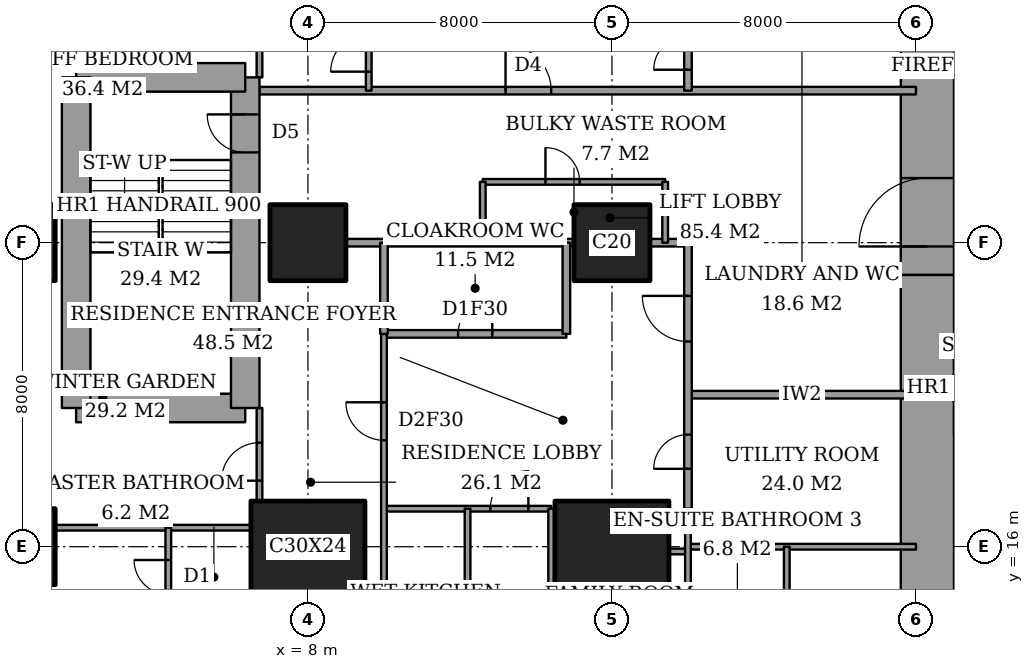
"""IFC4 building model, lengths in metres.
Left out: names, types, materials, properties, quantities, classifications, styles, units other than length and angle.
Written with IfcOpenShell. Run it as: python <this file> out.ifc"""

import sys

from ifc_helpers import new_model, si_unit, direction, frame, frame_2d, origin, origin_2d, place, context, subcontext, project, spatial, rectangle, extrude, element, fill, save


model = new_model("IFC4")
c1 = context("Model", 3, precision=1e-05, world=origin(), true_north=direction((0.0, 1.0)))
c2 = subcontext(c1, "Body", "Model", "MODEL_VIEW")
j1 = project(units=[si_unit("LENGTHUNIT", "METRE"), si_unit("PLANEANGLEUNIT", "RADIAN")], contexts=[c1])
p1 = place(None, origin())
s1 = spatial("IfcSite", under=j1, at=p1, CompositionType="ELEMENT")
p2 = place(p1, origin())
s2 = spatial("IfcBuilding", under=s1, at=p2, CompositionType="ELEMENT")
p3 = place(p2, frame((0.0, 0.0, 54.8)))
s3 = spatial("IfcBuildingStorey", under=s2, at=p3, CompositionType="ELEMENT", Elevation=54.8)
for number, where, z_axis, x_axis in (
    (1, (0.35, 16.0, 0.0), (0.0, 0.0, 1.0), (1.0, 0.0, 0.0)),
    (2, (0.35, 24.0, 0.0), (0.0, 0.0, 1.0), (1.0, 0.0, 0.0)),
):
    element("IfcColumn", number, at=place(p3, frame(where, z_axis=z_axis, x_axis=x_axis)), inside=s3, PredefinedType="COLUMN", context=c2, shape_type="SweptSolid", body=[
        extrude(rectangle(XDim=2.0, YDim=2.0, at=origin_2d()), origin(), (0.0, 0.0, 1.0), 3.6),
    ])
p4 = place(p3, frame((8.0, 16.0, 0.0), z_axis=(0.0, 0.0, 1.0), x_axis=(1.0, 0.0, 0.0)))
e3 = element("IfcColumn", 3, at=p4, inside=s3, PredefinedType="COLUMN", context=c2, shape_type="SweptSolid", body=[
    extrude(rectangle(XDim=3.0, YDim=2.4, at=origin_2d()), origin(), (0.0, 0.0, 1.0), 3.6),
])
p5 = place(p3, frame((8.0, 24.0, 0.0), z_axis=(0.0, 0.0, 1.0), x_axis=(1.0, 0.0, 0.0)))
e4 = element("IfcColumn", 4, at=p5, inside=s3, PredefinedType="COLUMN", context=c2, shape_type="SweptSolid", body=[
    extrude(rectangle(XDim=2.0, YDim=2.0, at=origin_2d()), origin(), (0.0, 0.0, 1.0), 3.6),
])
p6 = place(p3, frame((16.0, 16.0, 0.0), z_axis=(0.0, 0.0, 1.0), x_axis=(1.0, 0.0, 0.0)))
e5 = element("IfcColumn", 5, at=p6, inside=s3, PredefinedType="COLUMN", context=c2, shape_type="SweptSolid", body=[
    extrude(rectangle(XDim=3.0, YDim=2.4, at=origin_2d()), origin(), (0.0, 0.0, 1.0), 3.6),
])
p7 = place(p3, frame((16.0, 24.0, 0.0), z_axis=(0.0, 0.0, 1.0), x_axis=(1.0, 0.0, 0.0)))
e6 = element("IfcColumn", 6, at=p7, inside=s3, PredefinedType="COLUMN", context=c2, shape_type="SweptSolid", body=[
    extrude(rectangle(XDim=2.0, YDim=2.0, at=origin_2d()), origin(), (0.0, 0.0, 1.0), 3.6),
])
p8 = place(p3, frame((24.3, 13.0, 0.0), z_axis=(0.0, 0.0, 1.0), x_axis=(0.0, 1.0, 0.0)))
e7 = element("IfcWall", 7, at=p8, inside=s3, PredefinedType="SHEAR", context=c2, shape_type="SweptSolid", body=[
    extrude(rectangle(XDim=10.15, YDim=1.4, at=frame_2d((5.075, 0.0))), origin(), (0.0, 0.0, 1.0), 3.6),
])
p9 = place(p3, frame((24.3, 23.15, 0.0), z_axis=(0.0, 0.0, 1.0), x_axis=(0.0, 1.0, 0.0)))
e8 = element("IfcWall", 8, at=p9, inside=s3, PredefinedType="SHEAR", context=c2, shape_type="SweptSolid", body=[
    extrude(rectangle(XDim=11.85, YDim=1.4, at=frame_2d((5.925, 0.0))), origin(), (0.0, 0.0, 1.0), 3.6),
])
p10 = place(p9, frame((0.75, 0.0, 0.0)))
e9 = element("IfcOpeningElement", 9, at=p10, cuts=e8, PredefinedType="OPENING", context=c2, shape_type="SweptSolid", body=[
    extrude(rectangle(XDim=1.8, YDim=2.4, at=frame_2d((0.9, 1.2))), frame((0.0, 0.71, 0.0), z_axis=(0.0, -1.0, 0.0), x_axis=(1.0, 0.0, 0.0)), (0.0, 0.0, 1.0), 1.42),
])
p11 = place(p3, frame((1.9, 19.65, 0.0), z_axis=(0.0, 0.0, 1.0), x_axis=(1.0, 0.0, 0.0)))
e10 = element("IfcWall", 10, at=p11, inside=s3, PredefinedType="SHEAR", context=c2, shape_type="SweptSolid", body=[
    extrude(rectangle(XDim=4.45, YDim=0.75, at=frame_2d((2.225, 0.0))), origin(), (0.0, 0.0, 1.0), 3.6),
])
p12 = place(p3, frame((6.35, 19.65, 0.0), z_axis=(0.0, 0.0, 1.0), x_axis=(0.0, 1.0, 0.0)))
e11 = element("IfcWall", 11, at=p12, inside=s3, PredefinedType="SHEAR", context=c2, shape_type="SweptSolid", body=[
    extrude(rectangle(XDim=8.7, YDim=0.75, at=frame_2d((4.35, 0.0))), origin(), (0.0, 0.0, 1.0), 3.6),
])
p13 = place(p12, frame((6.725, 0.0, 0.0)))
e12 = element("IfcOpeningElement", 12, at=p13, cuts=e11, PredefinedType="OPENING", context=c2, shape_type="SweptSolid", body=[
    extrude(rectangle(XDim=1.0, YDim=2.1, at=frame_2d((0.5, 1.05))), frame((0.0, 0.385, 0.0), z_axis=(0.0, -1.0, 0.0), x_axis=(1.0, 0.0, 0.0)), (0.0, 0.0, 1.0), 0.77),
])
p14 = place(p3, frame((6.35, 28.35, 0.0), z_axis=(0.0, 0.0, 1.0), x_axis=(-1.0, 0.0, 0.0)))
e13 = element("IfcWall", 13, at=p14, inside=s3, PredefinedType="SHEAR", context=c2, shape_type="SweptSolid", body=[
    extrude(rectangle(XDim=4.45, YDim=0.75, at=frame_2d((2.225, 0.0))), origin(), (0.0, 0.0, 1.0), 3.6),
])
p15 = place(p3, frame((1.9, 28.35, 0.0), z_axis=(0.0, 0.0, 1.0), x_axis=(0.0, -1.0, 0.0)))
e14 = element("IfcWall", 14, at=p15, inside=s3, PredefinedType="SHEAR", context=c2, shape_type="SweptSolid", body=[
    extrude(rectangle(XDim=8.7, YDim=0.75, at=frame_2d((4.35, 0.0))), origin(), (0.0, 0.0, 1.0), 3.6),
])
p16 = place(p3, frame((17.5, 15.875, 0.0), z_axis=(0.0, 0.0, 1.0), x_axis=(1.0, 0.0, 0.0)))
e15 = element("IfcWall", 15, at=p16, inside=s3, PredefinedType="PARTITIONING", context=c2, shape_type="SweptSolid", body=[
    extrude(rectangle(XDim=0.5, YDim=0.15, at=frame_2d((0.25, 0.0))), origin(), (0.0, 0.0, 1.0), 2.634),
])
p17 = place(p3, frame((18.0, 16.0, 0.0), z_axis=(0.0, 0.0, 1.0), x_axis=(1.0, 0.0, 0.0)))
e16 = element("IfcWall", 16, at=p17, inside=s3, PredefinedType="PARTITIONING", context=c2, shape_type="SweptSolid", body=[
    extrude(rectangle(XDim=6.0, YDim=0.15, at=frame_2d((3.0, 0.0))), origin(), (0.0, 0.0, 1.0), 2.634),
])
p18 = place(p3, frame((1.35, 16.5, 0.0), z_axis=(0.0, 0.0, 1.0), x_axis=(1.0, 0.0, 0.0)))
e17 = element("IfcWall", 17, at=p18, inside=s3, PredefinedType="PARTITIONING", context=c2, shape_type="SweptSolid", body=[
    extrude(rectangle(XDim=5.15, YDim=0.15, at=frame_2d((2.575, 0.0))), origin(), (0.0, 0.0, 1.0), 3.35),
])
p19 = place(p3, frame((10.0, 17.0, 0.0), z_axis=(0.0, 0.0, 1.0), x_axis=(1.0, 0.0, 0.0)))
e18 = element("IfcWall", 18, at=p19, inside=s3, PredefinedType="PARTITIONING", context=c2, shape_type="SweptSolid", body=[
    extrude(rectangle(XDim=4.4, YDim=0.15, at=frame_2d((2.2, 0.0))), origin(), (0.0, 0.0, 1.0), 3.35),
])
p20 = place(p19, frame((2.8, 0.0, 0.0)))
e19 = element("IfcOpeningElement", 19, at=p20, cuts=e18, PredefinedType="OPENING", context=c2, shape_type="SweptSolid", body=[
    extrude(rectangle(XDim=1.0, YDim=2.1, at=frame_2d((0.5, 1.05))), frame((0.0, 0.085, 0.0), z_axis=(0.0, -1.0, 0.0), x_axis=(1.0, 0.0, 0.0)), (0.0, 0.0, 1.0), 0.17),
])
p21 = place(p3, frame((18.0, 20.0, 0.0), z_axis=(0.0, 0.0, 1.0), x_axis=(1.0, 0.0, 0.0)))
e20 = element("IfcWall", 20, at=p21, inside=s3, PredefinedType="PARTITIONING", context=c2, shape_type="SweptSolid", body=[
    extrude(rectangle(XDim=6.0, YDim=0.2, at=frame_2d((3.0, 0.0))), origin(), (0.0, 0.0, 1.0), 3.35),
])
p22 = place(p3, frame((10.0, 21.6, 0.0), z_axis=(0.0, 0.0, 1.0), x_axis=(1.0, 0.0, 0.0)))
e21 = element("IfcWall", 21, at=p22, inside=s3, PredefinedType="PARTITIONING", context=c2, shape_type="SweptSolid", body=[
    extrude(rectangle(XDim=4.8, YDim=0.2, at=frame_2d((2.4, 0.0))), origin(), (0.0, 0.0, 1.0), 3.35),
])
p23 = place(p22, frame((1.95, 0.0, 0.0)))
e22 = element("IfcOpeningElement", 22, at=p23, cuts=e21, PredefinedType="OPENING", context=c2, shape_type="SweptSolid", body=[
    extrude(rectangle(XDim=0.9, YDim=2.1, at=frame_2d((0.45, 1.05))), frame((0.0, 0.11, 0.0), z_axis=(0.0, -1.0, 0.0), x_axis=(1.0, 0.0, 0.0)), (0.0, 0.0, 1.0), 0.22),
])
p24 = place(p3, frame((9.0, 24.0, 0.0), z_axis=(0.0, 0.0, 1.0), x_axis=(1.0, 0.0, 0.0)))
e23 = element("IfcWall", 23, at=p24, inside=s3, PredefinedType="PARTITIONING", context=c2, shape_type="SweptSolid", body=[
    extrude(rectangle(XDim=6.0, YDim=0.2, at=frame_2d((3.0, 0.0))), origin(), (0.0, 0.0, 1.0), 3.35),
])
p25 = place(p3, frame((17.0, 24.0, 0.0), z_axis=(0.0, 0.0, 1.0), x_axis=(1.0, 0.0, 0.0)))
e24 = element("IfcWall", 24, at=p25, inside=s3, PredefinedType="PARTITIONING", context=c2, shape_type="SweptSolid", body=[
    extrude(rectangle(XDim=1.0, YDim=0.2, at=frame_2d((0.5, 0.0))), origin(), (0.0, 0.0, 1.0), 3.35),
])
p26 = place(p3, frame((12.6, 25.6, 0.0), z_axis=(0.0, 0.0, 1.0), x_axis=(1.0, 0.0, 0.0)))
e25 = element("IfcWall", 25, at=p26, inside=s3, PredefinedType="PARTITIONING", context=c2, shape_type="SweptSolid", body=[
    extrude(rectangle(XDim=4.8, YDim=0.15, at=frame_2d((2.4, 0.0))), origin(), (0.0, 0.0, 1.0), 3.35),
])
p27 = place(p26, frame((1.65, 0.0, 0.0)))
e26 = element("IfcOpeningElement", 26, at=p27, cuts=e25, PredefinedType="OPENING", context=c2, shape_type="SweptSolid", body=[
    extrude(rectangle(XDim=0.9, YDim=2.1, at=frame_2d((0.45, 1.05))), frame((0.0, 0.085, 0.0), z_axis=(0.0, -1.0, 0.0), x_axis=(1.0, 0.0, 0.0)), (0.0, 0.0, 1.0), 0.17),
])
p28 = place(p3, frame((6.725, 28.0, 0.0), z_axis=(0.0, 0.0, 1.0), x_axis=(1.0, 0.0, 0.0)))
e27 = element("IfcWall", 27, at=p28, inside=s3, PredefinedType="PARTITIONING", context=c2, shape_type="SweptSolid", body=[
    extrude(rectangle(XDim=17.275, YDim=0.2, at=frame_2d((8.637, 0.0))), origin(), (0.0, 0.0, 1.0), 3.35),
])
p29 = place(p28, frame((6.475, 0.0, 0.0)))
e28 = element("IfcOpeningElement", 28, at=p29, cuts=e27, PredefinedType="OPENING", context=c2, shape_type="SweptSolid", body=[
    extrude(rectangle(XDim=1.2, YDim=2.4, at=frame_2d((0.6, 1.2))), frame((0.0, 0.11, 0.0), z_axis=(0.0, -1.0, 0.0), x_axis=(1.0, 0.0, 0.0)), (0.0, 0.0, 1.0), 0.22),
])
p30 = place(p3, frame((4.325, 13.9, 0.0), z_axis=(0.0, 0.0, 1.0), x_axis=(0.0, 1.0, 0.0)))
e29 = element("IfcWall", 29, at=p30, inside=s3, PredefinedType="PARTITIONING", context=c2, shape_type="SweptSolid", body=[
    extrude(rectangle(XDim=2.6, YDim=0.15, at=frame_2d((1.3, 0.0))), origin(), (0.0, 0.0, 1.0), 3.35),
])
p31 = place(p30, frame((0.85, 0.0, 0.0)))
e30 = element("IfcOpeningElement", 30, at=p31, cuts=e29, PredefinedType="OPENING", context=c2, shape_type="SweptSolid", body=[
    extrude(rectangle(XDim=0.9, YDim=2.1, at=frame_2d((0.45, 1.05))), frame((0.0, 0.085, 0.0), z_axis=(0.0, -1.0, 0.0), x_axis=(1.0, 0.0, 0.0)), (0.0, 0.0, 1.0), 0.17),
])
p32 = place(p3, frame((6.725, 17.2, 0.0), z_axis=(0.0, 0.0, 1.0), x_axis=(0.0, 1.0, 0.0)))
e31 = element("IfcWall", 31, at=p32, inside=s3, PredefinedType="PARTITIONING", context=c2, shape_type="SweptSolid", body=[
    extrude(rectangle(XDim=2.45, YDim=0.15, at=frame_2d((1.225, 0.0))), origin(), (0.0, 0.0, 1.0), 3.35),
])
p33 = place(p32, frame((0.538, 0.0, 0.0)))
e32 = element("IfcOpeningElement", 32, at=p33, cuts=e31, PredefinedType="OPENING", context=c2, shape_type="SweptSolid", body=[
    extrude(rectangle(XDim=1.0, YDim=2.1, at=frame_2d((0.5, 1.05))), frame((0.0, 0.085, 0.0), z_axis=(0.0, -1.0, 0.0), x_axis=(1.0, 0.0, 0.0)), (0.0, 0.0, 1.0), 0.17),
])
p34 = place(p3, frame((6.725, 28.35, 0.0), z_axis=(0.0, 0.0, 1.0), x_axis=(0.0, 1.0, 0.0)))
e33 = element("IfcWall", 33, at=p34, inside=s3, PredefinedType="PARTITIONING", context=c2, shape_type="SweptSolid", body=[
    extrude(rectangle(XDim=2.45, YDim=0.15, at=frame_2d((1.225, 0.0))), origin(), (0.0, 0.0, 1.0), 3.35),
])
p35 = place(p34, frame((0.913, 0.0, 0.0)))
e34 = element("IfcOpeningElement", 34, at=p35, cuts=e33, PredefinedType="OPENING", context=c2, shape_type="SweptSolid", body=[
    extrude(rectangle(XDim=1.0, YDim=2.1, at=frame_2d((0.5, 1.05))), frame((0.0, 0.085, 0.0), z_axis=(0.0, -1.0, 0.0), x_axis=(1.0, 0.0, 0.0)), (0.0, 0.0, 1.0), 0.17),
])
p36 = place(p3, frame((9.6, 28.0, 0.0), z_axis=(0.0, 0.0, 1.0), x_axis=(0.0, 1.0, 0.0)))
e35 = element("IfcWall", 35, at=p36, inside=s3, PredefinedType="PARTITIONING", context=c2, shape_type="SweptSolid", body=[
    extrude(rectangle(XDim=9.4, YDim=0.15, at=frame_2d((4.7, 0.0))), origin(), (0.0, 0.0, 1.0), 3.35),
])
p37 = place(p36, frame((0.5, 0.0, 0.0)))
e36 = element("IfcOpeningElement", 36, at=p37, cuts=e35, PredefinedType="OPENING", context=c2, shape_type="SweptSolid", body=[
    extrude(rectangle(XDim=1.0, YDim=2.1, at=frame_2d((0.5, 1.05))), frame((0.0, 0.085, 0.0), z_axis=(0.0, -1.0, 0.0), x_axis=(1.0, 0.0, 0.0)), (0.0, 0.0, 1.0), 0.17),
])
p38 = place(p3, frame((10.0, 21.6, 0.0), z_axis=(0.0, 0.0, 1.0), x_axis=(0.0, 1.0, 0.0)))
e37 = element("IfcWall", 37, at=p38, inside=s3, PredefinedType="PARTITIONING", context=c2, shape_type="SweptSolid", body=[
    extrude(rectangle(XDim=2.4, YDim=0.2, at=frame_2d((1.2, 0.0))), origin(), (0.0, 0.0, 1.0), 3.35),
])
p39 = place(p3, frame((10.0, 10.6, 0.0), z_axis=(0.0, 0.0, 1.0), x_axis=(0.0, 1.0, 0.0)))
e38 = element("IfcWall", 38, at=p39, inside=s3, PredefinedType="PARTITIONING", context=c2, shape_type="SweptSolid", body=[
    extrude(rectangle(XDim=11.0, YDim=0.15, at=frame_2d((5.5, 0.0))), origin(), (0.0, 0.0, 1.0), 3.35),
])
p40 = place(p39, frame((8.2, 0.0, 0.0)))
e39 = element("IfcOpeningElement", 39, at=p40, cuts=e38, PredefinedType="OPENING", context=c2, shape_type="SweptSolid", body=[
    extrude(rectangle(XDim=1.0, YDim=2.1, at=frame_2d((0.5, 1.05))), frame((0.0, 0.085, 0.0), z_axis=(0.0, -1.0, 0.0), x_axis=(1.0, 0.0, 0.0)), (0.0, 0.0, 1.0), 0.17),
])
p41 = place(p3, frame((12.2, 10.6, 0.0), z_axis=(0.0, 0.0, 1.0), x_axis=(0.0, 1.0, 0.0)))
e40 = element("IfcWall", 40, at=p41, inside=s3, PredefinedType="PARTITIONING", context=c2, shape_type="SweptSolid", body=[
    extrude(rectangle(XDim=6.4, YDim=0.15, at=frame_2d((3.2, 0.0))), origin(), (0.0, 0.0, 1.0), 3.35),
])
p42 = place(p3, frame((12.6, 24.0, 0.0), z_axis=(0.0, 0.0, 1.0), x_axis=(0.0, 1.0, 0.0)))
e41 = element("IfcWall", 41, at=p42, inside=s3, PredefinedType="PARTITIONING", context=c2, shape_type="SweptSolid", body=[
    extrude(rectangle(XDim=1.6, YDim=0.15, at=frame_2d((0.8, 0.0))), origin(), (0.0, 0.0, 1.0), 3.35),
])
p43 = place(p3, frame((14.4, 10.6, 0.0), z_axis=(0.0, 0.0, 1.0), x_axis=(0.0, 1.0, 0.0)))
e42 = element("IfcWall", 42, at=p43, inside=s3, PredefinedType="PARTITIONING", context=c2, shape_type="SweptSolid", body=[
    extrude(rectangle(XDim=6.4, YDim=0.15, at=frame_2d((3.2, 0.0))), origin(), (0.0, 0.0, 1.0), 3.35),
])
p44 = place(p3, frame((14.8, 21.6, 0.0), z_axis=(0.0, 0.0, 1.0), x_axis=(0.0, 1.0, 0.0)))
e43 = element("IfcWall", 43, at=p44, inside=s3, PredefinedType="PARTITIONING", context=c2, shape_type="SweptSolid", body=[
    extrude(rectangle(XDim=2.4, YDim=0.2, at=frame_2d((1.2, 0.0))), origin(), (0.0, 0.0, 1.0), 3.35),
])
p45 = place(p3, frame((17.4, 24.0, 0.0), z_axis=(0.0, 0.0, 1.0), x_axis=(0.0, 1.0, 0.0)))
e44 = element("IfcWall", 44, at=p45, inside=s3, PredefinedType="PARTITIONING", context=c2, shape_type="SweptSolid", body=[
    extrude(rectangle(XDim=1.6, YDim=0.15, at=frame_2d((0.8, 0.0))), origin(), (0.0, 0.0, 1.0), 3.35),
])
p46 = place(p3, frame((18.0, 17.0, 0.0), z_axis=(0.0, 0.0, 1.0), x_axis=(0.0, 1.0, 0.0)))
e45 = element("IfcWall", 45, at=p46, inside=s3, PredefinedType="PARTITIONING", context=c2, shape_type="SweptSolid", body=[
    extrude(rectangle(XDim=7.0, YDim=0.2, at=frame_2d((3.5, 0.0))), origin(), (0.0, 0.0, 1.0), 3.35),
])
p47 = place(p46, frame((4.4, 0.0, 0.0)))
e46 = element("IfcOpeningElement", 46, at=p47, cuts=e45, PredefinedType="OPENING", context=c2, shape_type="SweptSolid", body=[
    extrude(rectangle(XDim=1.2, YDim=2.4, at=frame_2d((0.6, 1.2))), frame((0.0, 0.11, 0.0), z_axis=(0.0, -1.0, 0.0), x_axis=(1.0, 0.0, 0.0)), (0.0, 0.0, 1.0), 0.22),
])
p48 = place(p46, frame((1.05, 0.0, 0.0)))
e47 = element("IfcOpeningElement", 47, at=p48, cuts=e45, PredefinedType="OPENING", context=c2, shape_type="SweptSolid", body=[
    extrude(rectangle(XDim=0.9, YDim=2.1, at=frame_2d((0.45, 1.05))), frame((0.0, 0.11, 0.0), z_axis=(0.0, -1.0, 0.0), x_axis=(1.0, 0.0, 0.0)), (0.0, 0.0, 1.0), 0.22),
])
p49 = place(p3, frame((18.0, 28.0, 0.0), z_axis=(0.0, 0.0, 1.0), x_axis=(0.0, 1.0, 0.0)))
e48 = element("IfcWall", 48, at=p49, inside=s3, PredefinedType="PARTITIONING", context=c2, shape_type="SweptSolid", body=[
    extrude(rectangle(XDim=3.1, YDim=0.2, at=frame_2d((1.55, 0.0))), origin(), (0.0, 0.0, 1.0), 3.35),
])
p50 = place(p49, frame((0.55, 0.0, 0.0)))
e49 = element("IfcOpeningElement", 49, at=p50, cuts=e48, PredefinedType="OPENING", context=c2, shape_type="SweptSolid", body=[
    extrude(rectangle(XDim=0.9, YDim=2.1, at=frame_2d((0.45, 1.05))), frame((0.0, 0.11, 0.0), z_axis=(0.0, -1.0, 0.0), x_axis=(1.0, 0.0, 0.0)), (0.0, 0.0, 1.0), 0.22),
])
p51 = place(p3, frame((18.0, 10.6, 0.0), z_axis=(0.0, 0.0, 1.0), x_axis=(0.0, 1.0, 0.0)))
e50 = element("IfcWall", 50, at=p51, inside=s3, PredefinedType="PARTITIONING", context=c2, shape_type="SweptSolid", body=[
    extrude(rectangle(XDim=6.4, YDim=0.15, at=frame_2d((3.2, 0.0))), origin(), (0.0, 0.0, 1.0), 3.35),
])
p52 = place(p3, frame((20.6, 13.4, 0.0), z_axis=(0.0, 0.0, 1.0), x_axis=(0.0, 1.0, 0.0)))
e51 = element("IfcWall", 51, at=p52, inside=s3, PredefinedType="PARTITIONING", context=c2, shape_type="SweptSolid", body=[
    extrude(rectangle(XDim=2.6, YDim=0.15, at=frame_2d((1.3, 0.0))), origin(), (0.0, 0.0, 1.0), 3.35),
])
p53 = place(p31, origin())
e52 = element("IfcDoor", 52, at=p53, inside=s3, OperationType="SINGLE_SWING_LEFT", PredefinedType="DOOR", context=c2, shape_type="SweptSolid", body=[
    extrude(rectangle(XDim=0.9, YDim=2.1, at=frame_2d((0.45, 1.05))), frame((0.0, 0.025, 0.0), z_axis=(0.0, -1.0, 0.0), x_axis=(1.0, 0.0, 0.0)), (0.0, 0.0, 1.0), 0.05),
])
fill(e30, e52)
p54 = place(p33, origin())
e53 = element("IfcDoor", 53, at=p54, inside=s3, OperationType="SINGLE_SWING_RIGHT", PredefinedType="DOOR", context=c2, shape_type="SweptSolid", body=[
    extrude(rectangle(XDim=1.0, YDim=2.1, at=frame_2d((0.5, 1.05))), frame((0.0, 0.025, 0.0), z_axis=(0.0, -1.0, 0.0), x_axis=(1.0, 0.0, 0.0)), (0.0, 0.0, 1.0), 0.05),
])
fill(e32, e53)
p55 = place(p40, origin())
e54 = element("IfcDoor", 54, at=p55, inside=s3, OperationType="SINGLE_SWING_LEFT", PredefinedType="DOOR", context=c2, shape_type="SweptSolid", body=[
    extrude(rectangle(XDim=1.0, YDim=2.1, at=frame_2d((0.5, 1.05))), frame((0.0, 0.025, 0.0), z_axis=(0.0, -1.0, 0.0), x_axis=(1.0, 0.0, 0.0)), (0.0, 0.0, 1.0), 0.05),
])
fill(e39, e54)
p56 = place(p23, origin())
e55 = element("IfcDoor", 55, at=p56, inside=s3, OperationType="SINGLE_SWING_LEFT", PredefinedType="DOOR", context=c2, shape_type="SweptSolid", body=[
    extrude(rectangle(XDim=0.9, YDim=2.1, at=frame_2d((0.45, 1.05))), frame((0.0, 0.025, 0.0), z_axis=(0.0, -1.0, 0.0), x_axis=(1.0, 0.0, 0.0)), (0.0, 0.0, 1.0), 0.05),
])
fill(e22, e55)
p57 = place(p47, origin())
e56 = element("IfcDoor", 56, at=p57, inside=s3, OperationType="SINGLE_SWING_LEFT", PredefinedType="DOOR", context=c2, shape_type="SweptSolid", body=[
    extrude(rectangle(XDim=1.2, YDim=2.4, at=frame_2d((0.6, 1.2))), frame((0.0, 0.025, 0.0), z_axis=(0.0, -1.0, 0.0), x_axis=(1.0, 0.0, 0.0)), (0.0, 0.0, 1.0), 0.05),
])
fill(e46, e56)
p58 = place(p20, origin())
e57 = element("IfcDoor", 57, at=p58, inside=s3, OperationType="SINGLE_SWING_LEFT", PredefinedType="DOOR", context=c2, shape_type="SweptSolid", body=[
    extrude(rectangle(XDim=1.0, YDim=2.1, at=frame_2d((0.5, 1.05))), frame((0.0, 0.025, 0.0), z_axis=(0.0, -1.0, 0.0), x_axis=(1.0, 0.0, 0.0)), (0.0, 0.0, 1.0), 0.05),
])
fill(e19, e57)
p59 = place(p48, origin())
e58 = element("IfcDoor", 58, at=p59, inside=s3, OperationType="SINGLE_SWING_RIGHT", PredefinedType="DOOR", context=c2, shape_type="SweptSolid", body=[
    extrude(rectangle(XDim=0.9, YDim=2.1, at=frame_2d((0.45, 1.05))), frame((0.0, 0.025, 0.0), z_axis=(0.0, -1.0, 0.0), x_axis=(1.0, 0.0, 0.0)), (0.0, 0.0, 1.0), 0.05),
])
fill(e47, e58)
p60 = place(p37, origin())
e59 = element("IfcDoor", 59, at=p60, inside=s3, OperationType="SINGLE_SWING_RIGHT", PredefinedType="DOOR", context=c2, shape_type="SweptSolid", body=[
    extrude(rectangle(XDim=1.0, YDim=2.1, at=frame_2d((0.5, 1.05))), frame((0.0, 0.025, 0.0), z_axis=(0.0, -1.0, 0.0), x_axis=(1.0, 0.0, 0.0)), (0.0, 0.0, 1.0), 0.05),
])
fill(e36, e59)
p61 = place(p29, origin())
e60 = element("IfcDoor", 60, at=p61, inside=s3, OperationType="SINGLE_SWING_RIGHT", PredefinedType="DOOR", context=c2, shape_type="SweptSolid", body=[
    extrude(rectangle(XDim=1.2, YDim=2.4, at=frame_2d((0.6, 1.2))), frame((0.0, 0.025, 0.0), z_axis=(0.0, -1.0, 0.0), x_axis=(1.0, 0.0, 0.0)), (0.0, 0.0, 1.0), 0.05),
])
fill(e28, e60)
p62 = place(p50, origin())
e61 = element("IfcDoor", 61, at=p62, inside=s3, OperationType="SINGLE_SWING_RIGHT", PredefinedType="DOOR", context=c2, shape_type="SweptSolid", body=[
    extrude(rectangle(XDim=0.9, YDim=2.1, at=frame_2d((0.45, 1.05))), frame((0.0, 0.025, 0.0), z_axis=(0.0, -1.0, 0.0), x_axis=(1.0, 0.0, 0.0)), (0.0, 0.0, 1.0), 0.05),
])
fill(e49, e61)
p63 = place(p27, origin())
e62 = element("IfcDoor", 62, at=p63, inside=s3, OperationType="SINGLE_SWING_RIGHT", PredefinedType="DOOR", context=c2, shape_type="SweptSolid", body=[
    extrude(rectangle(XDim=0.9, YDim=2.1, at=frame_2d((0.45, 1.05))), frame((0.0, 0.025, 0.0), z_axis=(0.0, -1.0, 0.0), x_axis=(1.0, 0.0, 0.0)), (0.0, 0.0, 1.0), 0.05),
])
fill(e26, e62)
p64 = place(p10, origin())
e63 = element("IfcDoor", 63, at=p64, inside=s3, OperationType="DOUBLE_DOOR_DOUBLE_SWING", PredefinedType="DOOR", context=c2, shape_type="SweptSolid", body=[
    extrude(rectangle(XDim=1.8, YDim=2.4, at=frame_2d((0.9, 1.2))), frame((0.0, 0.025, 0.0), z_axis=(0.0, -1.0, 0.0), x_axis=(1.0, 0.0, 0.0)), (0.0, 0.0, 1.0), 0.05),
])
fill(e9, e63)
p65 = place(p13, origin())
e64 = element("IfcDoor", 64, at=p65, inside=s3, OperationType="SINGLE_SWING_LEFT", PredefinedType="DOOR", context=c2, shape_type="SweptSolid", body=[
    extrude(rectangle(XDim=1.0, YDim=2.1, at=frame_2d((0.5, 1.05))), frame((0.0, 0.025, 0.0), z_axis=(0.0, -1.0, 0.0), x_axis=(1.0, 0.0, 0.0)), (0.0, 0.0, 1.0), 0.05),
])
fill(e12, e64)
save(model, sys.argv[1])
